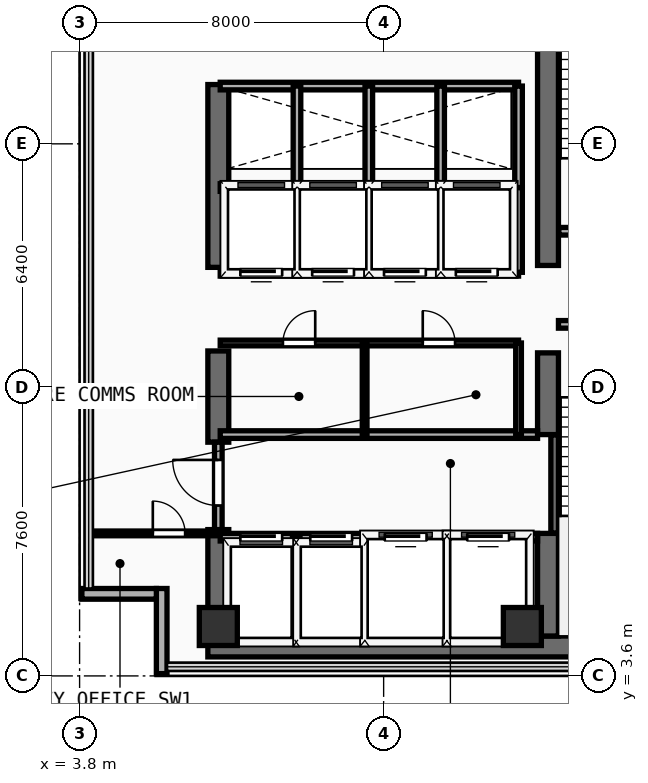
"""IFC4 building model, lengths in metres.
Left out: names, types, materials, properties, quantities, classifications, styles, units other than length and angle.
Written with IfcOpenShell. Run it as: python <this file> out.ifc"""

import sys

from ifc_helpers import new_model, si_unit, direction, frame, frame_2d, origin, origin_2d, place, context, subcontext, project, spatial, rectangle, extrude, element, fill, save


model = new_model("IFC4")
c1 = context("Model", 3, precision=1e-05, world=origin(), true_north=direction((0.0, 1.0)))
c2 = subcontext(c1, "Body", "Model", "MODEL_VIEW")
j1 = project(units=[si_unit("LENGTHUNIT", "METRE"), si_unit("PLANEANGLEUNIT", "RADIAN")], contexts=[c1])
p1 = place(None, origin())
s1 = spatial("IfcSite", under=j1, at=p1, CompositionType="ELEMENT")
p2 = place(p1, origin())
s2 = spatial("IfcBuilding", under=s1, at=p2, CompositionType="ELEMENT")
p3 = place(p2, frame((0.0, 0.0, 215.9)))
s3 = spatial("IfcBuildingStorey", under=s2, at=p3, CompositionType="ELEMENT", Elevation=215.9)
p4 = place(p3, frame((7.175, 4.375, 0.0), z_axis=(0.0, 0.0, 1.0), x_axis=(1.0, 0.0, 0.0)))
e1 = element("IfcWall", 1, at=p4, inside=s3, PredefinedType="SHEAR", context=c2, shape_type="SweptSolid", body=[
    extrude(rectangle(XDim=13.9, YDim=0.55, at=frame_2d((6.95, 0.0))), origin(), (0.0, 0.0, 1.0), 3.56),
])
p5 = place(p3, frame((7.45, 4.65, 0.0), z_axis=(0.0, 0.0, 1.0), x_axis=(0.0, 1.0, 0.0)))
e2 = element("IfcWall", 2, at=p5, inside=s3, PredefinedType="SHEAR", context=c2, shape_type="SweptSolid", body=[
    extrude(rectangle(XDim=2.8, YDim=0.55, at=frame_2d((1.4, 0.0))), origin(), (0.0, 0.0, 1.0), 3.56),
])
p6 = place(p3, frame((7.45, 9.75, 0.0), z_axis=(0.0, 0.0, 1.0), x_axis=(0.0, 1.0, 0.0)))
e3 = element("IfcWall", 3, at=p6, inside=s3, PredefinedType="SHEAR", context=c2, shape_type="SweptSolid", body=[
    extrude(rectangle(XDim=2.4, YDim=0.55, at=frame_2d((1.2, 0.0))), origin(), (0.0, 0.0, 1.0), 3.56),
])
p7 = place(p3, frame((7.45, 14.35, 0.0), z_axis=(0.0, 0.0, 1.0), x_axis=(0.0, 1.0, 0.0)))
e4 = element("IfcWall", 4, at=p7, inside=s3, PredefinedType="SHEAR", context=c2, shape_type="SweptSolid", body=[
    extrude(rectangle(XDim=4.81, YDim=0.55, at=frame_2d((2.405, 0.0))), origin(), (0.0, 0.0, 1.0), 3.56),
])
p8 = place(p3, frame((16.125, 4.65, 0.0), z_axis=(0.0, 0.0, 1.0), x_axis=(0.0, 1.0, 0.0)))
e5 = element("IfcWall", 5, at=p8, inside=s3, PredefinedType="SHEAR", context=c2, shape_type="SweptSolid", body=[
    extrude(rectangle(XDim=2.7, YDim=0.55, at=frame_2d((1.35, 0.0))), origin(), (0.0, 0.0, 1.0), 3.56),
])
p9 = place(p3, frame((16.125, 9.95, 0.0), z_axis=(0.0, 0.0, 1.0), x_axis=(0.0, 1.0, 0.0)))
e6 = element("IfcWall", 6, at=p9, inside=s3, PredefinedType="SHEAR", context=c2, shape_type="SweptSolid", body=[
    extrude(rectangle(XDim=2.15, YDim=0.55, at=frame_2d((1.075, 0.0))), origin(), (0.0, 0.0, 1.0), 3.56),
])
p10 = place(p3, frame((16.125, 14.4, 0.0), z_axis=(0.0, 0.0, 1.0), x_axis=(0.0, 1.0, 0.0)))
e7 = element("IfcWall", 7, at=p10, inside=s3, PredefinedType="SHEAR", context=c2, shape_type="SweptSolid", body=[
    extrude(rectangle(XDim=9.1, YDim=0.55, at=frame_2d((4.55, 0.0))), origin(), (0.0, 0.0, 1.0), 3.56),
])
for number, where, z_axis, x_axis in (
    (8, (7.45, 4.9, 0.0), (0.0, 0.0, 1.0), (1.0, 0.0, 0.0)),
    (9, (15.45, 4.9, 0.0), (0.0, 0.0, 1.0), (1.0, 0.0, 0.0)),
):
    element("IfcColumn", number, at=place(p3, frame(where, z_axis=z_axis, x_axis=x_axis)), inside=s3, PredefinedType="COLUMN", context=c2, shape_type="SweptSolid", body=[
        extrude(rectangle(XDim=1.0, YDim=1.0, at=origin_2d()), origin(), (0.0, 0.0, 1.0), 3.56),
    ])
p11 = place(p3, frame((5.96, 3.66, 0.0), z_axis=(0.0, 0.0, 1.0), x_axis=(0.0, 1.0, 0.0)))
e10 = element("IfcWall", 10, at=p11, inside=s3, PredefinedType="SOLIDWALL", context=c2, shape_type="SweptSolid", body=[
    extrude(rectangle(XDim=2.24, YDim=0.28, at=frame_2d((1.12, 0.0))), origin(), (0.0, 0.0, 1.0), 3.56),
])
p12 = place(p3, frame((3.86, 5.76, 0.0), z_axis=(0.0, 0.0, 1.0), x_axis=(1.0, 0.0, 0.0)))
e11 = element("IfcWall", 11, at=p12, inside=s3, PredefinedType="SOLIDWALL", context=c2, shape_type="SweptSolid", body=[
    extrude(rectangle(XDim=1.96, YDim=0.28, at=frame_2d((0.98, 0.0))), origin(), (0.0, 0.0, 1.0), 3.56),
])
p13 = place(p3, frame((16.3, 7.36, 0.0), z_axis=(0.0, 0.0, 1.0), x_axis=(0.0, 1.0, 0.0)))
e12 = element("IfcWall", 12, at=p13, inside=s3, PredefinedType="SHEAR", context=c2, shape_type="SweptSolid", body=[
    extrude(rectangle(XDim=2.58, YDim=0.2, at=frame_2d((1.29, 0.0))), origin(), (0.0, 0.0, 1.0), 3.56),
])
p14 = place(p3, frame((16.4, 12.85, 0.0), z_axis=(0.0, 0.0, 1.0), x_axis=(1.0, 0.0, 0.0)))
e13 = element("IfcWall", 13, at=p14, inside=s3, PredefinedType="PARTITIONING", context=c2, shape_type="SweptSolid", body=[
    extrude(rectangle(XDim=3.96, YDim=0.2, at=frame_2d((1.98, 0.0))), origin(), (0.0, 0.0, 1.0), 3.56),
])
p15 = place(p14, frame((1.304, 0.0, 0.0)))
e14 = element("IfcOpeningElement", 14, at=p15, cuts=e13, PredefinedType="OPENING", context=c2, shape_type="SweptSolid", body=[
    extrude(rectangle(XDim=1.1, YDim=2.2, at=frame_2d((0.55, 1.1))), frame((0.0, 0.11, 0.0), z_axis=(0.0, -1.0, 0.0), x_axis=(1.0, 0.0, 0.0)), (0.0, 0.0, 1.0), 0.22),
])
p16 = place(p3, frame((16.41, 15.3, 0.0), z_axis=(0.0, 0.0, 1.0), x_axis=(1.0, 0.0, 0.0)))
e15 = element("IfcWall", 15, at=p16, inside=s3, PredefinedType="PARTITIONING", context=c2, shape_type="SweptSolid", body=[
    extrude(rectangle(XDim=3.95, YDim=0.2, at=frame_2d((1.975, 0.0))), origin(), (0.0, 0.0, 1.0), 3.56),
])
p17 = place(p16, frame((1.294, 0.0, 0.0)))
e16 = element("IfcOpeningElement", 16, at=p17, cuts=e15, PredefinedType="OPENING", context=c2, shape_type="SweptSolid", body=[
    extrude(rectangle(XDim=1.1, YDim=2.2, at=frame_2d((0.55, 1.1))), frame((0.0, 0.11, 0.0), z_axis=(0.0, -1.0, 0.0), x_axis=(1.0, 0.0, 0.0)), (0.0, 0.0, 1.0), 0.22),
])
p18 = place(p3, frame((7.5, 7.25, 0.0), z_axis=(0.0, 0.0, 1.0), x_axis=(1.0, 0.0, 0.0)))
e17 = element("IfcWall", 17, at=p18, inside=s3, PredefinedType="PARTITIONING", context=c2, shape_type="SweptSolid", body=[
    extrude(rectangle(XDim=8.35, YDim=0.2, at=frame_2d((4.175, 0.0))), origin(), (0.0, 0.0, 1.0), 3.56),
])
p19 = place(p18, frame((0.53, 0.0, 0.0)))
e18 = element("IfcOpeningElement", 18, at=p19, cuts=e17, PredefinedType="OPENING", context=c2, shape_type="SweptSolid", body=[
    extrude(rectangle(XDim=1.1, YDim=2.2, at=frame_2d((0.55, 1.1))), frame((0.0, 0.11, 0.0), z_axis=(0.0, -1.0, 0.0), x_axis=(1.0, 0.0, 0.0)), (0.0, 0.0, 1.0), 0.22),
])
p20 = place(p18, frame((2.37, 0.0, 0.0)))
e19 = element("IfcOpeningElement", 19, at=p20, cuts=e17, PredefinedType="OPENING", context=c2, shape_type="SweptSolid", body=[
    extrude(rectangle(XDim=1.1, YDim=2.2, at=frame_2d((0.55, 1.1))), frame((0.0, 0.11, 0.0), z_axis=(0.0, -1.0, 0.0), x_axis=(1.0, 0.0, 0.0)), (0.0, 0.0, 1.0), 0.22),
])
p21 = place(p18, frame((4.33, 0.0, 0.0)))
e20 = element("IfcOpeningElement", 20, at=p21, cuts=e17, PredefinedType="OPENING", context=c2, shape_type="SweptSolid", body=[
    extrude(rectangle(XDim=1.1, YDim=2.2, at=frame_2d((0.55, 1.1))), frame((0.0, 0.11, 0.0), z_axis=(0.0, -1.0, 0.0), x_axis=(1.0, 0.0, 0.0)), (0.0, 0.0, 1.0), 0.22),
])
p22 = place(p18, frame((6.5, 0.0, 0.0)))
e21 = element("IfcOpeningElement", 21, at=p22, cuts=e17, PredefinedType="OPENING", context=c2, shape_type="SweptSolid", body=[
    extrude(rectangle(XDim=1.1, YDim=2.2, at=frame_2d((0.55, 1.1))), frame((0.0, 0.11, 0.0), z_axis=(0.0, -1.0, 0.0), x_axis=(1.0, 0.0, 0.0)), (0.0, 0.0, 1.0), 0.22),
])
p23 = place(p3, frame((7.5, 9.95, 0.0), z_axis=(0.0, 0.0, 1.0), x_axis=(1.0, 0.0, 0.0)))
e22 = element("IfcWall", 22, at=p23, inside=s3, PredefinedType="PARTITIONING", context=c2, shape_type="SweptSolid", body=[
    extrude(rectangle(XDim=8.35, YDim=0.2, at=frame_2d((4.175, 0.0))), origin(), (0.0, 0.0, 1.0), 3.56),
])
for number, where, z_axis, x_axis in (
    (23, (9.5, 4.45, 0.0), (0.0, 0.0, 1.0), (0.0, 1.0, 0.0)),
    (24, (11.36, 4.45, 0.0), (0.0, 0.0, 1.0), (0.0, 1.0, 0.0)),
    (25, (13.46, 4.45, 0.0), (0.0, 0.0, 1.0), (0.0, 1.0, 0.0)),
):
    element("IfcWall", number, at=place(p3, frame(where, z_axis=z_axis, x_axis=x_axis)), inside=s3, PredefinedType="PARTITIONING", context=c2, shape_type="SweptSolid", body=[
        extrude(rectangle(XDim=2.8, YDim=0.2, at=frame_2d((1.4, 0.0))), origin(), (0.0, 0.0, 1.0), 3.56),
    ])
p24 = place(p3, frame((7.45, 7.45, 0.0), z_axis=(0.0, 0.0, 1.0), x_axis=(0.0, 1.0, 0.0)))
e26 = element("IfcWall", 26, at=p24, inside=s3, PredefinedType="PARTITIONING", context=c2, shape_type="SweptSolid", body=[
    extrude(rectangle(XDim=2.3, YDim=0.2, at=frame_2d((1.15, 0.0))), origin(), (0.0, 0.0, 1.0), 2.54),
])
p25 = place(p24, frame((0.633, 0.0, 0.0)))
e27 = element("IfcOpeningElement", 27, at=p25, cuts=e26, PredefinedType="OPENING", context=c2, shape_type="SweptSolid", body=[
    extrude(rectangle(XDim=1.2, YDim=2.25, at=frame_2d((0.6, 1.125))), frame((0.0, 0.11, 0.0), z_axis=(0.0, -1.0, 0.0), x_axis=(1.0, 0.0, 0.0)), (0.0, 0.0, 1.0), 0.22),
])
p26 = place(p3, frame((7.5, 12.36, 0.0), z_axis=(0.0, 0.0, 1.0), x_axis=(1.0, 0.0, 0.0)))
e28 = element("IfcWall", 28, at=p26, inside=s3, PredefinedType="PARTITIONING", context=c2, shape_type="SweptSolid", body=[
    extrude(rectangle(XDim=7.85, YDim=0.15, at=frame_2d((3.925, 0.0))), origin(), (0.0, 0.0, 1.0), 3.56),
])
p27 = place(p26, frame((1.65, 0.0, 0.0)))
e29 = element("IfcOpeningElement", 29, at=p27, cuts=e28, PredefinedType="OPENING", context=c2, shape_type="SweptSolid", body=[
    extrude(rectangle(XDim=0.85, YDim=2.15, at=frame_2d((0.425, 1.075))), frame((0.0, 0.085, 0.0), z_axis=(0.0, -1.0, 0.0), x_axis=(1.0, 0.0, 0.0)), (0.0, 0.0, 1.0), 0.17),
])
p28 = place(p26, frame((5.329, 0.0, 0.0)))
e30 = element("IfcOpeningElement", 30, at=p28, cuts=e28, PredefinedType="OPENING", context=c2, shape_type="SweptSolid", body=[
    extrude(rectangle(XDim=0.85, YDim=2.15, at=frame_2d((0.425, 1.075))), frame((0.0, 0.085, 0.0), z_axis=(0.0, -1.0, 0.0), x_axis=(1.0, 0.0, 0.0)), (0.0, 0.0, 1.0), 0.17),
])
p29 = place(p3, frame((15.35, 9.95, 0.0), z_axis=(0.0, 0.0, 1.0), x_axis=(0.0, 1.0, 0.0)))
e31 = element("IfcWall", 31, at=p29, inside=s3, PredefinedType="PARTITIONING", context=c2, shape_type="SweptSolid", body=[
    extrude(rectangle(XDim=2.41, YDim=0.15, at=frame_2d((1.205, 0.0))), origin(), (0.0, 0.0, 1.0), 3.56),
])
p30 = place(p3, frame((11.3, 9.95, 0.0), z_axis=(0.0, 0.0, 1.0), x_axis=(0.0, 1.0, 0.0)))
e32 = element("IfcWall", 32, at=p30, inside=s3, PredefinedType="PARTITIONING", context=c2, shape_type="SweptSolid", body=[
    extrude(rectangle(XDim=2.41, YDim=0.125, at=frame_2d((1.205, 0.0))), origin(), (0.0, 0.0, 1.0), 3.56),
])
p31 = place(p3, frame((7.5, 14.22, 0.0), z_axis=(0.0, 0.0, 1.0), x_axis=(1.0, 0.0, 0.0)))
e33 = element("IfcWall", 33, at=p31, inside=s3, PredefinedType="PARTITIONING", context=c2, shape_type="SweptSolid", body=[
    extrude(rectangle(XDim=7.85, YDim=0.2, at=frame_2d((3.925, 0.0))), origin(), (0.0, 0.0, 1.0), 3.56),
])
p32 = place(p31, frame((0.53, 0.0, 0.0)))
e34 = element("IfcOpeningElement", 34, at=p32, cuts=e33, PredefinedType="OPENING", context=c2, shape_type="SweptSolid", body=[
    extrude(rectangle(XDim=1.1, YDim=2.2, at=frame_2d((0.55, 1.1))), frame((0.0, 0.11, 0.0), z_axis=(0.0, -1.0, 0.0), x_axis=(1.0, 0.0, 0.0)), (0.0, 0.0, 1.0), 0.22),
])
p33 = place(p31, frame((2.42, 0.0, 0.0)))
e35 = element("IfcOpeningElement", 35, at=p33, cuts=e33, PredefinedType="OPENING", context=c2, shape_type="SweptSolid", body=[
    extrude(rectangle(XDim=1.1, YDim=2.2, at=frame_2d((0.55, 1.1))), frame((0.0, 0.11, 0.0), z_axis=(0.0, -1.0, 0.0), x_axis=(1.0, 0.0, 0.0)), (0.0, 0.0, 1.0), 0.22),
])
p34 = place(p31, frame((4.31, 0.0, 0.0)))
e36 = element("IfcOpeningElement", 36, at=p34, cuts=e33, PredefinedType="OPENING", context=c2, shape_type="SweptSolid", body=[
    extrude(rectangle(XDim=1.1, YDim=2.2, at=frame_2d((0.55, 1.1))), frame((0.0, 0.11, 0.0), z_axis=(0.0, -1.0, 0.0), x_axis=(1.0, 0.0, 0.0)), (0.0, 0.0, 1.0), 0.22),
])
p35 = place(p31, frame((6.2, 0.0, 0.0)))
e37 = element("IfcOpeningElement", 37, at=p35, cuts=e33, PredefinedType="OPENING", context=c2, shape_type="SweptSolid", body=[
    extrude(rectangle(XDim=1.1, YDim=2.2, at=frame_2d((0.55, 1.1))), frame((0.0, 0.11, 0.0), z_axis=(0.0, -1.0, 0.0), x_axis=(1.0, 0.0, 0.0)), (0.0, 0.0, 1.0), 0.22),
])
p36 = place(p3, frame((7.5, 16.45, 0.0), z_axis=(0.0, 0.0, 1.0), x_axis=(1.0, 0.0, 0.0)))
e38 = element("IfcWall", 38, at=p36, inside=s3, PredefinedType="PARTITIONING", context=c2, shape_type="SweptSolid", body=[
    extrude(rectangle(XDim=7.85, YDim=0.2, at=frame_2d((3.925, 0.0))), origin(), (0.0, 0.0, 1.0), 3.56),
])
for number, where, z_axis, x_axis in (
    (39, (15.35, 14.22, 0.0), (0.0, 0.0, 1.0), (0.0, 1.0, 0.0)),
    (40, (9.52, 14.22, 0.0), (0.0, 0.0, 1.0), (0.0, 1.0, 0.0)),
    (41, (11.41, 14.22, 0.0), (0.0, 0.0, 1.0), (0.0, 1.0, 0.0)),
    (42, (13.3, 14.22, 0.0), (0.0, 0.0, 1.0), (0.0, 1.0, 0.0)),
):
    element("IfcWall", number, at=place(p3, frame(where, z_axis=z_axis, x_axis=x_axis)), inside=s3, PredefinedType="PARTITIONING", context=c2, shape_type="SweptSolid", body=[
        extrude(rectangle(XDim=2.23, YDim=0.2, at=frame_2d((1.115, 0.0))), origin(), (0.0, 0.0, 1.0), 3.56),
    ])
p37 = place(p3, frame((7.5, 19.12, 0.0), z_axis=(0.0, 0.0, 1.0), x_axis=(1.0, 0.0, 0.0)))
e43 = element("IfcWall", 43, at=p37, inside=s3, PredefinedType="PARTITIONING", context=c2, shape_type="SweptSolid", body=[
    extrude(rectangle(XDim=7.85, YDim=0.2, at=frame_2d((3.925, 0.0))), origin(), (0.0, 0.0, 1.0), 3.56),
])
for number, where, z_axis, x_axis in (
    (44, (15.35, 16.45, 0.0), (0.0, 0.0, 1.0), (0.0, 1.0, 0.0)),
    (45, (9.52, 16.45, 0.0), (0.0, 0.0, 1.0), (0.0, 1.0, 0.0)),
    (46, (11.41, 16.45, 0.0), (0.0, 0.0, 1.0), (0.0, 1.0, 0.0)),
    (47, (13.3, 16.45, 0.0), (0.0, 0.0, 1.0), (0.0, 1.0, 0.0)),
):
    element("IfcWall", number, at=place(p3, frame(where, z_axis=z_axis, x_axis=x_axis)), inside=s3, PredefinedType="PARTITIONING", context=c2, shape_type="SweptSolid", body=[
        extrude(rectangle(XDim=2.67, YDim=0.2, at=frame_2d((1.335, 0.0))), origin(), (0.0, 0.0, 1.0), 3.56),
    ])
p38 = place(p3, frame((4.04, 7.35, 0.0), z_axis=(0.0, 0.0, 1.0), x_axis=(1.0, 0.0, 0.0)))
e48 = element("IfcWall", 48, at=p38, inside=s3, PredefinedType="PARTITIONING", context=c2, shape_type="SweptSolid", body=[
    extrude(rectangle(XDim=3.36, YDim=0.125, at=frame_2d((1.68, 0.0))), origin(), (0.0, 0.0, 1.0), 3.56),
])
p39 = place(p38, frame((1.687, 0.0, 0.0)))
e49 = element("IfcOpeningElement", 49, at=p39, cuts=e48, PredefinedType="OPENING", context=c2, shape_type="SweptSolid", body=[
    extrude(rectangle(XDim=0.85, YDim=2.15, at=frame_2d((0.425, 1.075))), frame((0.0, 0.073, 0.0), z_axis=(0.0, -1.0, 0.0), x_axis=(1.0, 0.0, 0.0)), (0.0, 0.0, 1.0), 0.145),
])
p40 = place(p19, origin())
e50 = element("IfcDoor", 50, at=p40, inside=s3, OperationType="SLIDING_TO_LEFT", PredefinedType="DOOR", context=c2, shape_type="SweptSolid", body=[
    extrude(rectangle(XDim=1.1, YDim=2.2, at=frame_2d((0.55, 1.1))), frame((0.0, 0.025, 0.0), z_axis=(0.0, -1.0, 0.0), x_axis=(1.0, 0.0, 0.0)), (0.0, 0.0, 1.0), 0.05),
])
fill(e18, e50)
p41 = place(p20, origin())
e51 = element("IfcDoor", 51, at=p41, inside=s3, OperationType="SLIDING_TO_LEFT", PredefinedType="DOOR", context=c2, shape_type="SweptSolid", body=[
    extrude(rectangle(XDim=1.1, YDim=2.2, at=frame_2d((0.55, 1.1))), frame((0.0, 0.025, 0.0), z_axis=(0.0, -1.0, 0.0), x_axis=(1.0, 0.0, 0.0)), (0.0, 0.0, 1.0), 0.05),
])
fill(e19, e51)
p42 = place(p21, origin())
e52 = element("IfcDoor", 52, at=p42, inside=s3, OperationType="SLIDING_TO_LEFT", PredefinedType="DOOR", context=c2, shape_type="SweptSolid", body=[
    extrude(rectangle(XDim=1.1, YDim=2.2, at=frame_2d((0.55, 1.1))), frame((0.0, 0.025, 0.0), z_axis=(0.0, -1.0, 0.0), x_axis=(1.0, 0.0, 0.0)), (0.0, 0.0, 1.0), 0.05),
])
fill(e20, e52)
p43 = place(p22, origin())
e53 = element("IfcDoor", 53, at=p43, inside=s3, OperationType="SLIDING_TO_LEFT", PredefinedType="DOOR", context=c2, shape_type="SweptSolid", body=[
    extrude(rectangle(XDim=1.1, YDim=2.2, at=frame_2d((0.55, 1.1))), frame((0.0, 0.025, 0.0), z_axis=(0.0, -1.0, 0.0), x_axis=(1.0, 0.0, 0.0)), (0.0, 0.0, 1.0), 0.05),
])
fill(e21, e53)
p44 = place(p25, frame((1.2, 0.0, 0.0), z_axis=(0.0, 0.0, 1.0), x_axis=(-1.0, 0.0, 0.0)))
e54 = element("IfcDoor", 54, at=p44, inside=s3, OperationType="SINGLE_SWING_LEFT", PredefinedType="DOOR", context=c2, shape_type="SweptSolid", body=[
    extrude(rectangle(XDim=1.2, YDim=2.25, at=frame_2d((0.6, 1.125))), frame((0.0, 0.025, 0.0), z_axis=(0.0, -1.0, 0.0), x_axis=(1.0, 0.0, 0.0)), (0.0, 0.0, 1.0), 0.05),
])
fill(e27, e54)
p45 = place(p27, origin())
e55 = element("IfcDoor", 55, at=p45, inside=s3, OperationType="SINGLE_SWING_RIGHT", PredefinedType="DOOR", context=c2, shape_type="SweptSolid", body=[
    extrude(rectangle(XDim=0.85, YDim=2.15, at=frame_2d((0.425, 1.075))), frame((0.0, 0.025, 0.0), z_axis=(0.0, -1.0, 0.0), x_axis=(1.0, 0.0, 0.0)), (0.0, 0.0, 1.0), 0.05),
])
fill(e29, e55)
p46 = place(p28, origin())
e56 = element("IfcDoor", 56, at=p46, inside=s3, OperationType="SINGLE_SWING_LEFT", PredefinedType="DOOR", context=c2, shape_type="SweptSolid", body=[
    extrude(rectangle(XDim=0.85, YDim=2.15, at=frame_2d((0.425, 1.075))), frame((0.0, 0.025, 0.0), z_axis=(0.0, -1.0, 0.0), x_axis=(1.0, 0.0, 0.0)), (0.0, 0.0, 1.0), 0.05),
])
fill(e30, e56)
p47 = place(p32, frame((1.1, 0.0, 0.0), z_axis=(0.0, 0.0, 1.0), x_axis=(-1.0, 0.0, 0.0)))
e57 = element("IfcDoor", 57, at=p47, inside=s3, OperationType="SLIDING_TO_LEFT", PredefinedType="DOOR", context=c2, shape_type="SweptSolid", body=[
    extrude(rectangle(XDim=1.1, YDim=2.2, at=frame_2d((0.55, 1.1))), frame((0.0, 0.025, 0.0), z_axis=(0.0, -1.0, 0.0), x_axis=(1.0, 0.0, 0.0)), (0.0, 0.0, 1.0), 0.05),
])
fill(e34, e57)
p48 = place(p33, frame((1.1, 0.0, 0.0), z_axis=(0.0, 0.0, 1.0), x_axis=(-1.0, 0.0, 0.0)))
e58 = element("IfcDoor", 58, at=p48, inside=s3, OperationType="SLIDING_TO_LEFT", PredefinedType="DOOR", context=c2, shape_type="SweptSolid", body=[
    extrude(rectangle(XDim=1.1, YDim=2.2, at=frame_2d((0.55, 1.1))), frame((0.0, 0.025, 0.0), z_axis=(0.0, -1.0, 0.0), x_axis=(1.0, 0.0, 0.0)), (0.0, 0.0, 1.0), 0.05),
])
fill(e35, e58)
p49 = place(p34, frame((1.1, 0.0, 0.0), z_axis=(0.0, 0.0, 1.0), x_axis=(-1.0, 0.0, 0.0)))
e59 = element("IfcDoor", 59, at=p49, inside=s3, OperationType="SLIDING_TO_LEFT", PredefinedType="DOOR", context=c2, shape_type="SweptSolid", body=[
    extrude(rectangle(XDim=1.1, YDim=2.2, at=frame_2d((0.55, 1.1))), frame((0.0, 0.025, 0.0), z_axis=(0.0, -1.0, 0.0), x_axis=(1.0, 0.0, 0.0)), (0.0, 0.0, 1.0), 0.05),
])
fill(e36, e59)
p50 = place(p35, frame((1.1, 0.0, 0.0), z_axis=(0.0, 0.0, 1.0), x_axis=(-1.0, 0.0, 0.0)))
e60 = element("IfcDoor", 60, at=p50, inside=s3, OperationType="SLIDING_TO_LEFT", PredefinedType="DOOR", context=c2, shape_type="SweptSolid", body=[
    extrude(rectangle(XDim=1.1, YDim=2.2, at=frame_2d((0.55, 1.1))), frame((0.0, 0.025, 0.0), z_axis=(0.0, -1.0, 0.0), x_axis=(1.0, 0.0, 0.0)), (0.0, 0.0, 1.0), 0.05),
])
fill(e37, e60)
p51 = place(p39, origin())
e61 = element("IfcDoor", 61, at=p51, inside=s3, OperationType="SINGLE_SWING_LEFT", PredefinedType="DOOR", context=c2, shape_type="SweptSolid", body=[
    extrude(rectangle(XDim=0.85, YDim=2.15, at=frame_2d((0.425, 1.075))), frame((0.0, 0.025, 0.0), z_axis=(0.0, -1.0, 0.0), x_axis=(1.0, 0.0, 0.0)), (0.0, 0.0, 1.0), 0.05),
])
fill(e49, e61)
save(model, sys.argv[1])
